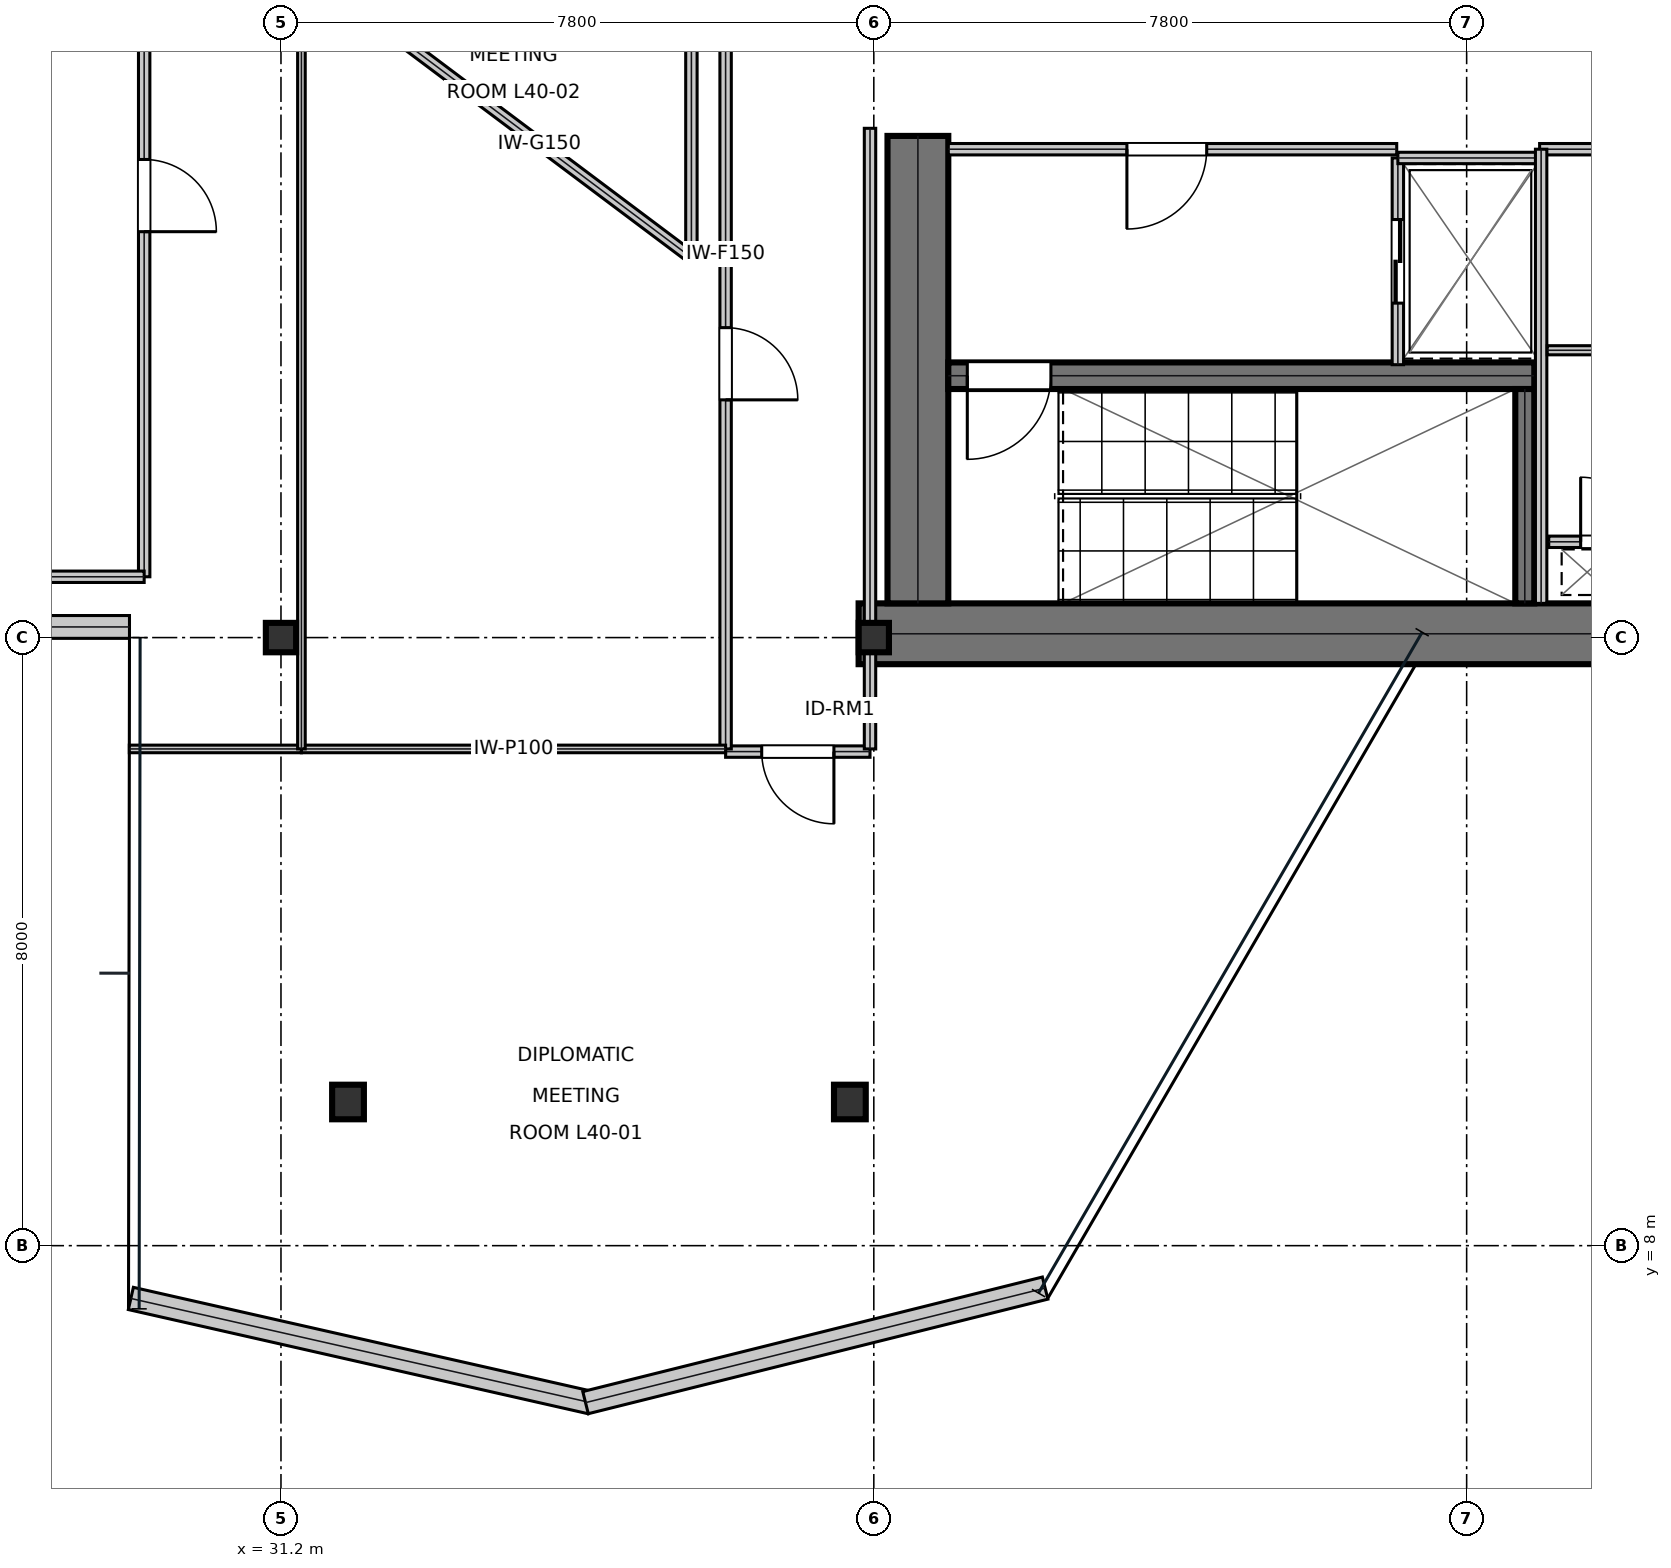
"""IFC4 building model, lengths in metres.
Left out: names, types, materials, properties, quantities, classifications, styles, units other than length and angle.
Written with IfcOpenShell. Run it as: python <this file> out.ifc"""

import sys

from ifc_helpers import new_model, si_unit, direction, frame, frame_2d, origin, origin_2d, place, context, subcontext, project, spatial, rectangle, i_section, extrude, element, fill, save


model = new_model("IFC4")
c1 = context("Model", 3, precision=1e-05, world=origin(), true_north=direction((0.0, 1.0)))
c2 = subcontext(c1, "Body", "Model", "MODEL_VIEW")
j1 = project(units=[si_unit("LENGTHUNIT", "METRE"), si_unit("PLANEANGLEUNIT", "RADIAN")], contexts=[c1])
p1 = place(None, origin())
s1 = spatial("IfcSite", under=j1, at=p1, CompositionType="ELEMENT")
p2 = place(p1, origin())
s2 = spatial("IfcBuilding", under=s1, at=p2, CompositionType="ELEMENT")
p3 = place(p2, frame((0.0, 0.0, 173.55)))
s3 = spatial("IfcBuildingStorey", under=s2, at=p3, CompositionType="ELEMENT", Elevation=173.55)
p4 = place(p3, frame((38.8, 16.05, 0.0), z_axis=(0.0, 0.0, 1.0), x_axis=(1.0, 0.0, 0.0)))
e1 = element("IfcWall", 1, at=p4, inside=s3, PredefinedType="SHEAR", context=c2, shape_type="SweptSolid", body=[
    extrude(rectangle(XDim=16.0, YDim=0.8, at=frame_2d((8.0, 0.0))), origin(), (0.0, 0.0, 1.0), 3.81),
])
p5 = place(p3, frame((39.58, 16.45, 0.0), z_axis=(0.0, 0.0, 1.0), x_axis=(0.0, 1.0, 0.0)))
e2 = element("IfcWall", 2, at=p5, inside=s3, PredefinedType="SHEAR", context=c2, shape_type="SweptSolid", body=[
    extrude(rectangle(XDim=6.15, YDim=0.8, at=frame_2d((3.075, 0.0))), origin(), (0.0, 0.0, 1.0), 3.81),
])
p6 = place(p3, frame((39.98, 19.445, 0.0), z_axis=(0.0, 0.0, 1.0), x_axis=(1.0, 0.0, 0.0)))
e3 = element("IfcWall", 3, at=p6, inside=s3, PredefinedType="SHEAR", context=c2, shape_type="SweptSolid", body=[
    extrude(rectangle(XDim=7.71, YDim=0.35, at=frame_2d((3.855, 0.0))), origin(), (0.0, 0.0, 1.0), 3.81),
])
p7 = place(p6, frame((0.25, 0.0, 0.0)))
e4 = element("IfcOpeningElement", 4, at=p7, cuts=e3, PredefinedType="OPENING", context=c2, shape_type="SweptSolid", body=[
    extrude(rectangle(XDim=1.1, YDim=2.15, at=frame_2d((0.55, 1.075))), frame((0.0, 0.185, 0.0), z_axis=(0.0, -1.0, 0.0), x_axis=(1.0, 0.0, 0.0)), (0.0, 0.0, 1.0), 0.37),
])
p8 = place(p3, frame((47.565, 16.45, 0.0), z_axis=(0.0, 0.0, 1.0), x_axis=(0.0, 1.0, 0.0)))
e5 = element("IfcWall", 5, at=p8, inside=s3, PredefinedType="SHEAR", context=c2, shape_type="SweptSolid", body=[
    extrude(rectangle(XDim=2.82, YDim=0.25, at=frame_2d((1.41, 0.0))), origin(), (0.0, 0.0, 1.0), 3.81),
])
for number, where, z_axis, x_axis in (
    (6, (31.2, 16.0, 0.0), (0.0, 0.0, 1.0), (1.0, 0.0, 0.0)),
    (7, (39.0, 16.0, 0.0), (0.0, 0.0, 1.0), (1.0, 0.0, 0.0)),
):
    element("IfcColumn", number, at=place(p3, frame(where, z_axis=z_axis, x_axis=x_axis)), inside=s3, PredefinedType="COLUMN", context=c2, shape_type="SweptSolid", body=[
        extrude(i_section(OverallWidth=0.398, OverallDepth=0.387, WebThickness=0.021, FlangeThickness=0.033, at=origin_2d()), origin(), (0.0, 0.0, 1.0), 4.044),
    ])
p9 = place(p3, frame((32.082, 9.89, 0.016), z_axis=(0.010447648562, 0.022413850693, 0.999694186207), x_axis=(-0.906371306068, 0.422482018004, 0.0)))
e8 = element("IfcColumn", 8, at=p9, inside=s3, PredefinedType="COLUMN", context=c2, shape_type="SweptSolid", body=[
    extrude(i_section(OverallWidth=0.418, OverallDepth=0.455, WebThickness=0.042, FlangeThickness=0.068, at=origin_2d()), origin(), (0.0, 0.0, 1.0), 4.019),
])
p10 = place(p3, frame((38.685, 9.89, 0.016), z_axis=(-0.003766191696, 0.022414915097, 0.999741660321), x_axis=(-0.986176372522, -0.165699011101, 0.0)))
e9 = element("IfcColumn", 9, at=p10, inside=s3, PredefinedType="COLUMN", context=c2, shape_type="SweptSolid", body=[
    extrude(i_section(OverallWidth=0.418, OverallDepth=0.455, WebThickness=0.042, FlangeThickness=0.068, at=origin_2d()), origin(), (0.0, 0.0, 1.0), 4.019),
])
p11 = place(p3, frame((26.408, 16.14, 0.0), z_axis=(0.0, 0.0, 1.0), x_axis=(1.0, 0.0, 0.0)))
e10 = element("IfcWall", 10, at=p11, inside=s3, PredefinedType="STANDARD", context=c2, shape_type="SweptSolid", body=[
    extrude(rectangle(XDim=2.799, YDim=0.3, at=frame_2d((1.399, 0.0))), origin(), (0.0, 0.0, 1.0), 3.81),
])
p12 = place(p3, frame((29.225, 7.305, 0.0), z_axis=(0.0, 0.0, 1.0), x_axis=(0.975288491541, -0.220935190199, 0.0)))
e11 = element("IfcWall", 11, at=p12, inside=s3, PredefinedType="STANDARD", context=c2, shape_type="SweptSolid", body=[
    extrude(rectangle(XDim=6.2, YDim=0.3, at=frame_2d((3.1, 0.0))), origin(), (0.0, 0.0, 1.0), 3.81),
])
p13 = place(p3, frame((35.207, 5.935, 0.0), z_axis=(0.0, 0.0, 1.0), x_axis=(0.970319679145, 0.241825805619, 0.0)))
e12 = element("IfcWall", 12, at=p13, inside=s3, PredefinedType="STANDARD", context=c2, shape_type="SweptSolid", body=[
    extrude(rectangle(XDim=6.232, YDim=0.3, at=frame_2d((3.116, 0.0))), origin(), (0.0, 0.0, 1.0), 3.81),
])
p14 = place(p3, frame((39.98, 22.425, 0.0), z_axis=(0.0, 0.0, 1.0), x_axis=(1.0, 0.0, 0.0)))
e13 = element("IfcWall", 13, at=p14, inside=s3, PredefinedType="PARTITIONING", context=c2, shape_type="SweptSolid", body=[
    extrude(rectangle(XDim=5.9, YDim=0.15, at=frame_2d((2.95, 0.0))), origin(), (0.0, 0.0, 1.0), 3.81),
])
p15 = place(p14, frame((2.35, 0.0, 0.0)))
e14 = element("IfcOpeningElement", 14, at=p15, cuts=e13, PredefinedType="OPENING", context=c2, shape_type="SweptSolid", body=[
    extrude(rectangle(XDim=1.05, YDim=2.15, at=frame_2d((0.525, 1.075))), frame((0.0, 0.085, 0.0), z_axis=(0.0, -1.0, 0.0), x_axis=(1.0, 0.0, 0.0)), (0.0, 0.0, 1.0), 0.17),
])
p16 = place(p3, frame((45.895, 19.59, 0.0), z_axis=(0.0, 0.0, 1.0), x_axis=(0.0, 1.0, 0.0)))
e15 = element("IfcWall", 15, at=p16, inside=s3, PredefinedType="PARTITIONING", context=c2, shape_type="SweptSolid", body=[
    extrude(rectangle(XDim=2.72, YDim=0.15, at=frame_2d((1.36, 0.0))), origin(), (0.0, 0.0, 1.0), 3.81),
])
p17 = place(p16, frame((0.81, 0.0, 0.0)))
e16 = element("IfcOpeningElement", 16, at=p17, cuts=e15, PredefinedType="OPENING", context=c2, shape_type="SweptSolid", body=[
    extrude(rectangle(XDim=1.1, YDim=2.15, at=frame_2d((0.55, 1.075))), frame((0.0, 0.085, 0.0), z_axis=(0.0, -1.0, 0.0), x_axis=(1.0, 0.0, 0.0)), (0.0, 0.0, 1.0), 0.17),
])
p18 = place(p3, frame((45.895, 22.31, 0.0), z_axis=(0.0, 0.0, 1.0), x_axis=(1.0, 0.0, 0.0)))
e17 = element("IfcWall", 17, at=p18, inside=s3, PredefinedType="PARTITIONING", context=c2, shape_type="SweptSolid", body=[
    extrude(rectangle(XDim=1.915, YDim=0.15, at=frame_2d((0.958, 0.0))), origin(), (0.0, 0.0, 1.0), 3.81),
])
p19 = place(p3, frame((47.88, 17.26, 0.0), z_axis=(0.0, 0.0, 1.0), x_axis=(1.0, 0.0, 0.0)))
e18 = element("IfcWall", 18, at=p19, inside=s3, PredefinedType="PARTITIONING", context=c2, shape_type="SweptSolid", body=[
    extrude(rectangle(XDim=1.72, YDim=0.15, at=frame_2d((0.86, 0.0))), origin(), (0.0, 0.0, 1.0), 3.81),
])
p20 = place(p19, frame((0.42, 0.0, 0.0)))
e19 = element("IfcOpeningElement", 19, at=p20, cuts=e18, PredefinedType="OPENING", context=c2, shape_type="SweptSolid", body=[
    extrude(rectangle(XDim=0.85, YDim=2.15, at=frame_2d((0.425, 1.075))), frame((0.0, 0.085, 0.0), z_axis=(0.0, -1.0, 0.0), x_axis=(1.0, 0.0, 0.0)), (0.0, 0.0, 1.0), 0.17),
])
p21 = place(p3, frame((47.76, 22.425, 0.0), z_axis=(0.0, 0.0, 1.0), x_axis=(1.0, 0.0, 0.0)))
e20 = element("IfcWall", 20, at=p21, inside=s3, PredefinedType="PARTITIONING", context=c2, shape_type="SweptSolid", body=[
    extrude(rectangle(XDim=1.96, YDim=0.15, at=frame_2d((0.98, 0.0))), origin(), (0.0, 0.0, 1.0), 3.81),
])
p22 = place(p3, frame((47.78, 16.45, 0.0), z_axis=(0.0, 0.0, 1.0), x_axis=(0.0, 1.0, 0.0)))
e21 = element("IfcWall", 21, at=p22, inside=s3, PredefinedType="PARTITIONING", context=c2, shape_type="SweptSolid", body=[
    extrude(rectangle(XDim=5.975, YDim=0.15, at=frame_2d((2.988, 0.0))), origin(), (0.0, 0.0, 1.0), 3.81),
])
p23 = place(p3, frame((47.86, 19.78, 0.0), z_axis=(0.0, 0.0, 1.0), x_axis=(1.0, 0.0, 0.0)))
e22 = element("IfcWall", 22, at=p23, inside=s3, PredefinedType="PARTITIONING", context=c2, shape_type="SweptSolid", body=[
    extrude(rectangle(XDim=1.76, YDim=0.12, at=frame_2d((0.88, 0.0))), origin(), (0.0, 0.0, 1.0), 3.81),
])
p24 = place(p3, frame((37.05, 14.5, 0.0), z_axis=(0.0, 0.0, 1.0), x_axis=(1.0, 0.0, 0.0)))
e23 = element("IfcWall", 23, at=p24, inside=s3, PredefinedType="PARTITIONING", context=c2, shape_type="SweptSolid", body=[
    extrude(rectangle(XDim=1.9, YDim=0.15, at=frame_2d((0.95, 0.0))), origin(), (0.0, 0.0, 1.0), 3.19),
])
p25 = place(p24, frame((0.475, 0.0, 0.0)))
e24 = element("IfcOpeningElement", 24, at=p25, cuts=e23, PredefinedType="OPENING", context=c2, shape_type="SweptSolid", body=[
    extrude(rectangle(XDim=0.95, YDim=2.15, at=frame_2d((0.475, 1.075))), frame((0.0, 0.085, 0.0), z_axis=(0.0, -1.0, 0.0), x_axis=(1.0, 0.0, 0.0)), (0.0, 0.0, 1.0), 0.17),
])
p26 = place(p3, frame((37.05, 14.535, 0.0), z_axis=(0.0, 0.0, 1.0), x_axis=(0.0, 1.0, 0.0)))
e25 = element("IfcWall", 25, at=p26, inside=s3, PredefinedType="PARTITIONING", context=c2, shape_type="SweptSolid", body=[
    extrude(rectangle(XDim=13.015, YDim=0.15, at=frame_2d((6.508, 0.0))), origin(), (0.0, 0.0, 1.0), 3.19),
])
p27 = place(p26, frame((4.593, 0.0, 0.0)))
e26 = element("IfcOpeningElement", 26, at=p27, cuts=e25, PredefinedType="OPENING", context=c2, shape_type="SweptSolid", body=[
    extrude(rectangle(XDim=0.95, YDim=2.15, at=frame_2d((0.475, 1.075))), frame((0.0, 0.085, 0.0), z_axis=(0.0, -1.0, 0.0), x_axis=(1.0, 0.0, 0.0)), (0.0, 0.0, 1.0), 0.17),
])
p28 = place(p3, frame((29.4, 16.8, 0.0), z_axis=(0.0, 0.0, 1.0), x_axis=(0.0, 1.0, 0.0)))
e27 = element("IfcWall", 27, at=p28, inside=s3, PredefinedType="PARTITIONING", context=c2, shape_type="SweptSolid", body=[
    extrude(rectangle(XDim=10.75, YDim=0.15, at=frame_2d((5.375, 0.0))), origin(), (0.0, 0.0, 1.0), 3.19),
])
p29 = place(p28, frame((4.54, 0.0, 0.0)))
e28 = element("IfcOpeningElement", 28, at=p29, cuts=e27, PredefinedType="OPENING", context=c2, shape_type="SweptSolid", body=[
    extrude(rectangle(XDim=0.95, YDim=2.15, at=frame_2d((0.475, 1.075))), frame((0.0, 0.085, 0.0), z_axis=(0.0, -1.0, 0.0), x_axis=(1.0, 0.0, 0.0)), (0.0, 0.0, 1.0), 0.17),
])
p30 = place(p3, frame((38.95, 14.535, 0.0), z_axis=(0.0, 0.0, 1.0), x_axis=(0.0, 1.0, 0.0)))
e29 = element("IfcWall", 29, at=p30, inside=s3, PredefinedType="PARTITIONING", context=c2, shape_type="SweptSolid", body=[
    extrude(rectangle(XDim=8.165, YDim=0.15, at=frame_2d((4.083, 0.0))), origin(), (0.0, 0.0, 1.0), 3.19),
])
p31 = place(p3, frame((27.5, 16.8, 0.0), z_axis=(0.0, 0.0, 1.0), x_axis=(1.0, 0.0, 0.0)))
e30 = element("IfcWall", 30, at=p31, inside=s3, PredefinedType="PARTITIONING", context=c2, shape_type="SweptSolid", body=[
    extrude(rectangle(XDim=1.9, YDim=0.15, at=frame_2d((0.95, 0.0))), origin(), (0.0, 0.0, 1.0), 3.338),
])
p32 = place(p3, frame((31.469, 14.535, 0.0), z_axis=(0.0, 0.0, 1.0), x_axis=(1.0, 0.0, 0.0)))
e31 = element("IfcWall", 31, at=p32, inside=s3, PredefinedType="PARTITIONING", context=c2, shape_type="SweptSolid", body=[
    extrude(rectangle(XDim=5.581, YDim=0.1, at=frame_2d((2.791, 0.0))), origin(), (0.0, 0.0, 1.0), 3.81),
])
p33 = place(p3, frame((29.205, 14.535, 0.0), z_axis=(0.0, 0.0, 1.0), x_axis=(1.0, 0.0, 0.0)))
e32 = element("IfcWall", 32, at=p33, inside=s3, PredefinedType="PARTITIONING", context=c2, shape_type="SweptSolid", body=[
    extrude(rectangle(XDim=2.264, YDim=0.1, at=frame_2d((1.132, 0.0))), origin(), (0.0, 0.0, 1.0), 3.81),
])
p34 = place(p3, frame((31.469, 14.535, 0.0), z_axis=(0.0, 0.0, 1.0), x_axis=(0.0, 1.0, 0.0)))
e33 = element("IfcWall", 33, at=p34, inside=s3, PredefinedType="PARTITIONING", context=c2, shape_type="SweptSolid", body=[
    extrude(rectangle(XDim=13.015, YDim=0.1, at=frame_2d((6.508, 0.0))), origin(), (0.0, 0.0, 1.0), 3.19),
])
p35 = place(p3, frame((32.6, 24.0, 0.0), z_axis=(0.0, 0.0, 1.0), x_axis=(0.8, -0.6, 0.0)))
e34 = element("IfcWall", 34, at=p35, inside=s3, PredefinedType="MOVABLE", context=c2, shape_type="SweptSolid", body=[
    extrude(rectangle(XDim=5.0, YDim=0.15, at=frame_2d((2.5, 0.0))), origin(), (0.0, 0.0, 1.0), 3.81),
])
p36 = place(p3, frame((36.6, 21.0, 0.0), z_axis=(0.0, 0.0, 1.0), x_axis=(0.0, 1.0, 0.0)))
e35 = element("IfcWall", 35, at=p36, inside=s3, PredefinedType="MOVABLE", context=c2, shape_type="SweptSolid", body=[
    extrude(rectangle(XDim=6.0, YDim=0.15, at=frame_2d((3.0, 0.0))), origin(), (0.0, 0.0, 1.0), 3.81),
])
p37 = place(p15, frame((1.05, 0.0, 0.0), z_axis=(0.0, 0.0, 1.0), x_axis=(-1.0, 0.0, 0.0)))
e36 = element("IfcDoor", 36, at=p37, inside=s3, OperationType="SINGLE_SWING_RIGHT", PredefinedType="DOOR", context=c2, shape_type="SweptSolid", body=[
    extrude(rectangle(XDim=1.05, YDim=2.15, at=frame_2d((0.525, 1.075))), frame((0.0, 0.025, 0.0), z_axis=(0.0, -1.0, 0.0), x_axis=(1.0, 0.0, 0.0)), (0.0, 0.0, 1.0), 0.05),
])
fill(e14, e36)
p38 = place(p17, frame((1.1, 0.0, 0.0), z_axis=(0.0, 0.0, 1.0), x_axis=(-1.0, 0.0, 0.0)))
e37 = element("IfcDoor", 37, at=p38, inside=s3, OperationType="DOUBLE_DOOR_SLIDING", PredefinedType="DOOR", context=c2, shape_type="SweptSolid", body=[
    extrude(rectangle(XDim=1.1, YDim=2.15, at=frame_2d((0.55, 1.075))), frame((0.0, 0.025, 0.0), z_axis=(0.0, -1.0, 0.0), x_axis=(1.0, 0.0, 0.0)), (0.0, 0.0, 1.0), 0.05),
])
fill(e16, e37)
p39 = place(p20, origin())
e38 = element("IfcDoor", 38, at=p39, inside=s3, OperationType="SINGLE_SWING_LEFT", PredefinedType="TRAPDOOR", context=c2, shape_type="SweptSolid", body=[
    extrude(rectangle(XDim=0.85, YDim=2.15, at=frame_2d((0.425, 1.075))), frame((0.0, 0.025, 0.0), z_axis=(0.0, -1.0, 0.0), x_axis=(1.0, 0.0, 0.0)), (0.0, 0.0, 1.0), 0.05),
])
fill(e19, e38)
p40 = place(p25, frame((0.95, 0.0, 0.0), z_axis=(0.0, 0.0, 1.0), x_axis=(-1.0, 0.0, 0.0)))
e39 = element("IfcDoor", 39, at=p40, inside=s3, OperationType="SINGLE_SWING_LEFT", PredefinedType="DOOR", context=c2, shape_type="SweptSolid", body=[
    extrude(rectangle(XDim=0.95, YDim=2.15, at=frame_2d((0.475, 1.075))), frame((0.0, 0.025, 0.0), z_axis=(0.0, -1.0, 0.0), x_axis=(1.0, 0.0, 0.0)), (0.0, 0.0, 1.0), 0.05),
])
fill(e24, e39)
p41 = place(p27, frame((0.95, 0.0, 0.0), z_axis=(0.0, 0.0, 1.0), x_axis=(-1.0, 0.0, 0.0)))
e40 = element("IfcDoor", 40, at=p41, inside=s3, OperationType="SINGLE_SWING_RIGHT", PredefinedType="DOOR", context=c2, shape_type="SweptSolid", body=[
    extrude(rectangle(XDim=0.95, YDim=2.15, at=frame_2d((0.475, 1.075))), frame((0.0, 0.025, 0.0), z_axis=(0.0, -1.0, 0.0), x_axis=(1.0, 0.0, 0.0)), (0.0, 0.0, 1.0), 0.05),
])
fill(e26, e40)
p42 = place(p29, frame((0.95, 0.0, 0.0), z_axis=(0.0, 0.0, 1.0), x_axis=(-1.0, 0.0, 0.0)))
e41 = element("IfcDoor", 41, at=p42, inside=s3, OperationType="SINGLE_SWING_RIGHT", PredefinedType="DOOR", context=c2, shape_type="SweptSolid", body=[
    extrude(rectangle(XDim=0.95, YDim=2.15, at=frame_2d((0.475, 1.075))), frame((0.0, 0.025, 0.0), z_axis=(0.0, -1.0, 0.0), x_axis=(1.0, 0.0, 0.0)), (0.0, 0.0, 1.0), 0.05),
])
fill(e28, e41)
p43 = place(p7, frame((1.1, 0.0, 0.0), z_axis=(0.0, 0.0, 1.0), x_axis=(-1.0, 0.0, 0.0)))
e42 = element("IfcDoor", 42, at=p43, inside=s3, OperationType="SINGLE_SWING_RIGHT", PredefinedType="DOOR", context=c2, shape_type="SweptSolid", body=[
    extrude(rectangle(XDim=1.1, YDim=2.15, at=frame_2d((0.55, 1.075))), frame((0.0, 0.025, 0.0), z_axis=(0.0, -1.0, 0.0), x_axis=(1.0, 0.0, 0.0)), (0.0, 0.0, 1.0), 0.05),
])
fill(e4, e42)
save(model, sys.argv[1])
